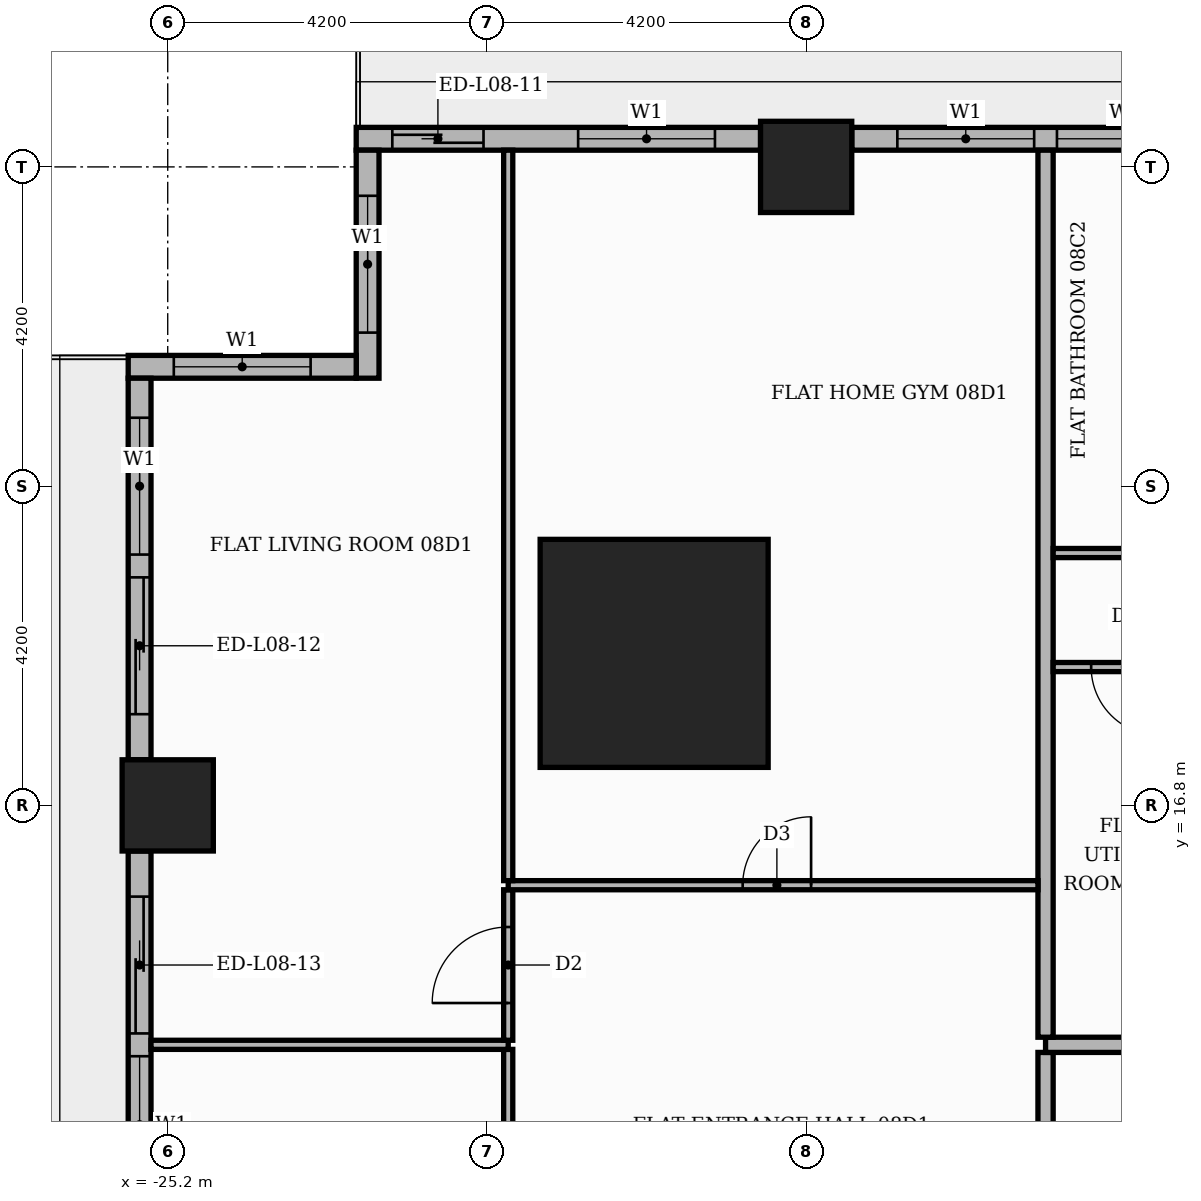
"""IFC4 building model, lengths in metres.
Left out: names, types, materials, properties, quantities, classifications, styles, units other than length and angle.
Written with IfcOpenShell. Run it as: python <this file> out.ifc"""

import sys

from ifc_helpers import new_model, si_unit, direction, frame, frame_2d, origin, origin_2d, place, context, subcontext, project, spatial, rectangle, extrude, element, fill, save


model = new_model("IFC4")
c1 = context("Model", 3, precision=1e-05, world=origin(), true_north=direction((0.0, 1.0)))
c2 = subcontext(c1, "Body", "Model", "MODEL_VIEW")
j1 = project(units=[si_unit("LENGTHUNIT", "METRE"), si_unit("PLANEANGLEUNIT", "RADIAN")], contexts=[c1])
p1 = place(None, origin())
s1 = spatial("IfcSite", under=j1, at=p1, CompositionType="ELEMENT")
p2 = place(p1, origin())
s2 = spatial("IfcBuilding", under=s1, at=p2, CompositionType="ELEMENT")
p3 = place(p2, frame((0.0, 0.0, 38.7)))
s3 = spatial("IfcBuildingStorey", under=s2, at=p3, CompositionType="ELEMENT", Elevation=38.7)
p4 = place(p3, frame((-18.8, 18.8, 0.0), z_axis=(0.0, 0.0, 1.0), x_axis=(1.0, 0.0, 0.0)))
e1 = element("IfcColumn", 1, at=p4, inside=s3, PredefinedType="COLUMN", context=c2, shape_type="SweptSolid", body=[
    extrude(rectangle(XDim=3.0, YDim=3.0, at=origin_2d()), origin(), (0.0, 0.0, 1.0), 3.9),
])
for number, where, z_axis, x_axis in (
    (2, (-16.8, 25.2, 0.0), (0.0, 0.0, 1.0), (1.0, 0.0, 0.0)),
    (3, (-25.2, 16.8, 0.0), (0.0, 0.0, 1.0), (1.0, 0.0, 0.0)),
):
    element("IfcColumn", number, at=place(p3, frame(where, z_axis=z_axis, x_axis=x_axis)), inside=s3, PredefinedType="COLUMN", context=c2, shape_type="SweptSolid", body=[
        extrude(rectangle(XDim=1.2, YDim=1.2, at=origin_2d()), origin(), (0.0, 0.0, 1.0), 3.9),
    ])
p5 = place(p3, frame((-9.0, 25.57, 0.0), z_axis=(0.0, 0.0, 1.0), x_axis=(-1.0, 0.0, 0.0)))
e4 = element("IfcWall", 4, at=p5, inside=s3, PredefinedType="STANDARD", context=c2, shape_type="SweptSolid", body=[
    extrude(rectangle(XDim=7.2, YDim=0.3, at=frame_2d((3.6, 0.0))), origin(), (0.0, 0.0, 1.0), 3.48),
])
p6 = place(p5, frame((0.6, 0.0, 0.9)))
e5 = element("IfcOpeningElement", 5, at=p6, cuts=e4, PredefinedType="OPENING", context=c2, shape_type="SweptSolid", body=[
    extrude(rectangle(XDim=1.8, YDim=2.1, at=frame_2d((0.9, 1.05))), frame((0.0, 0.16, 0.0), z_axis=(0.0, -1.0, 0.0), x_axis=(1.0, 0.0, 0.0)), (0.0, 0.0, 1.0), 0.32),
])
p7 = place(p5, frame((2.7, 0.0, 0.9)))
e6 = element("IfcOpeningElement", 6, at=p7, cuts=e4, PredefinedType="OPENING", context=c2, shape_type="SweptSolid", body=[
    extrude(rectangle(XDim=1.8, YDim=2.1, at=frame_2d((0.9, 1.05))), frame((0.0, 0.16, 0.0), z_axis=(0.0, -1.0, 0.0), x_axis=(1.0, 0.0, 0.0)), (0.0, 0.0, 1.0), 0.32),
])
p8 = place(p5, frame((4.8, 0.0, 0.9)))
e7 = element("IfcOpeningElement", 7, at=p8, cuts=e4, PredefinedType="OPENING", context=c2, shape_type="SweptSolid", body=[
    extrude(rectangle(XDim=1.8, YDim=2.1, at=frame_2d((0.9, 1.05))), frame((0.0, 0.16, 0.0), z_axis=(0.0, -1.0, 0.0), x_axis=(1.0, 0.0, 0.0)), (0.0, 0.0, 1.0), 0.32),
])
p9 = place(p3, frame((-17.4, 25.57, 0.0), z_axis=(0.0, 0.0, 1.0), x_axis=(-1.0, 0.0, 0.0)))
e8 = element("IfcWall", 8, at=p9, inside=s3, PredefinedType="STANDARD", context=c2, shape_type="SweptSolid", body=[
    extrude(rectangle(XDim=5.32, YDim=0.3, at=frame_2d((2.66, 0.0))), origin(), (0.0, 0.0, 1.0), 3.48),
])
p10 = place(p9, frame((0.6, 0.0, 0.9)))
e9 = element("IfcOpeningElement", 9, at=p10, cuts=e8, PredefinedType="OPENING", context=c2, shape_type="SweptSolid", body=[
    extrude(rectangle(XDim=1.8, YDim=2.1, at=frame_2d((0.9, 1.05))), frame((0.0, 0.16, 0.0), z_axis=(0.0, -1.0, 0.0), x_axis=(1.0, 0.0, 0.0)), (0.0, 0.0, 1.0), 0.32),
])
p11 = place(p9, frame((3.645, 0.0, 0.0)))
e10 = element("IfcOpeningElement", 10, at=p11, cuts=e8, PredefinedType="OPENING", context=c2, shape_type="SweptSolid", body=[
    extrude(rectangle(XDim=1.2, YDim=2.4, at=frame_2d((0.6, 1.2))), frame((0.0, 0.16, 0.0), z_axis=(0.0, -1.0, 0.0), x_axis=(1.0, 0.0, 0.0)), (0.0, 0.0, 1.0), 0.32),
])
p12 = place(p3, frame((-22.57, 25.42, 0.0), z_axis=(0.0, 0.0, 1.0), x_axis=(0.0, -1.0, 0.0)))
e11 = element("IfcWall", 11, at=p12, inside=s3, PredefinedType="STANDARD", context=c2, shape_type="SweptSolid", body=[
    extrude(rectangle(XDim=3.0, YDim=0.3, at=frame_2d((1.5, 0.0))), origin(), (0.0, 0.0, 1.0), 3.48),
])
p13 = place(p12, frame((0.6, 0.0, 0.9)))
e12 = element("IfcOpeningElement", 12, at=p13, cuts=e11, PredefinedType="OPENING", context=c2, shape_type="SweptSolid", body=[
    extrude(rectangle(XDim=1.8, YDim=2.1, at=frame_2d((0.9, 1.05))), frame((0.0, 0.16, 0.0), z_axis=(0.0, -1.0, 0.0), x_axis=(1.0, 0.0, 0.0)), (0.0, 0.0, 1.0), 0.32),
])
p14 = place(p3, frame((-22.72, 22.57, 0.0), z_axis=(0.0, 0.0, 1.0), x_axis=(-1.0, 0.0, 0.0)))
e13 = element("IfcWall", 13, at=p14, inside=s3, PredefinedType="STANDARD", context=c2, shape_type="SweptSolid", body=[
    extrude(rectangle(XDim=3.0, YDim=0.3, at=frame_2d((1.5, 0.0))), origin(), (0.0, 0.0, 1.0), 3.48),
])
p15 = place(p14, frame((0.6, 0.0, 0.9)))
e14 = element("IfcOpeningElement", 14, at=p15, cuts=e13, PredefinedType="OPENING", context=c2, shape_type="SweptSolid", body=[
    extrude(rectangle(XDim=1.8, YDim=2.1, at=frame_2d((0.9, 1.05))), frame((0.0, 0.16, 0.0), z_axis=(0.0, -1.0, 0.0), x_axis=(1.0, 0.0, 0.0)), (0.0, 0.0, 1.0), 0.32),
])
p16 = place(p3, frame((-25.57, 22.42, 0.0), z_axis=(0.0, 0.0, 1.0), x_axis=(0.0, -1.0, 0.0)))
e15 = element("IfcWall", 15, at=p16, inside=s3, PredefinedType="STANDARD", context=c2, shape_type="SweptSolid", body=[
    extrude(rectangle(XDim=5.02, YDim=0.3, at=frame_2d((2.51, 0.0))), origin(), (0.0, 0.0, 1.0), 3.48),
])
p17 = place(p16, frame((0.52, 0.0, 0.9)))
e16 = element("IfcOpeningElement", 16, at=p17, cuts=e15, PredefinedType="OPENING", context=c2, shape_type="SweptSolid", body=[
    extrude(rectangle(XDim=1.8, YDim=2.1, at=frame_2d((0.9, 1.05))), frame((0.0, 0.16, 0.0), z_axis=(0.0, -1.0, 0.0), x_axis=(1.0, 0.0, 0.0)), (0.0, 0.0, 1.0), 0.32),
])
p18 = place(p16, frame((2.62, 0.0, 0.0)))
e17 = element("IfcOpeningElement", 17, at=p18, cuts=e15, PredefinedType="OPENING", context=c2, shape_type="SweptSolid", body=[
    extrude(rectangle(XDim=1.8, YDim=2.4, at=frame_2d((0.9, 1.2))), frame((0.0, 0.16, 0.0), z_axis=(0.0, -1.0, 0.0), x_axis=(1.0, 0.0, 0.0)), (0.0, 0.0, 1.0), 0.32),
])
p19 = place(p3, frame((-25.57, 16.2, 0.0), z_axis=(0.0, 0.0, 1.0), x_axis=(0.0, -1.0, 0.0)))
e18 = element("IfcWall", 18, at=p19, inside=s3, PredefinedType="STANDARD", context=c2, shape_type="SweptSolid", body=[
    extrude(rectangle(XDim=7.2, YDim=0.3, at=frame_2d((3.6, 0.0))), origin(), (0.0, 0.0, 1.0), 3.48),
])
p20 = place(p19, frame((0.6, 0.0, 0.0)))
e19 = element("IfcOpeningElement", 19, at=p20, cuts=e18, PredefinedType="OPENING", context=c2, shape_type="SweptSolid", body=[
    extrude(rectangle(XDim=1.8, YDim=2.4, at=frame_2d((0.9, 1.2))), frame((0.0, 0.16, 0.0), z_axis=(0.0, -1.0, 0.0), x_axis=(1.0, 0.0, 0.0)), (0.0, 0.0, 1.0), 0.32),
])
p21 = place(p19, frame((2.7, 0.0, 0.9)))
e20 = element("IfcOpeningElement", 20, at=p21, cuts=e18, PredefinedType="OPENING", context=c2, shape_type="SweptSolid", body=[
    extrude(rectangle(XDim=1.8, YDim=2.1, at=frame_2d((0.9, 1.05))), frame((0.0, 0.16, 0.0), z_axis=(0.0, -1.0, 0.0), x_axis=(1.0, 0.0, 0.0)), (0.0, 0.0, 1.0), 0.32),
])
p22 = place(p19, frame((4.8, 0.0, 0.0)))
e21 = element("IfcOpeningElement", 21, at=p22, cuts=e18, PredefinedType="OPENING", context=c2, shape_type="SweptSolid", body=[
    extrude(rectangle(XDim=1.8, YDim=2.4, at=frame_2d((0.9, 1.2))), frame((0.0, 0.16, 0.0), z_axis=(0.0, -1.0, 0.0), x_axis=(1.0, 0.0, 0.0)), (0.0, 0.0, 1.0), 0.32),
])
p23 = place(p3, frame((-13.65, -13.55, 0.0), z_axis=(0.0, 0.0, 1.0), x_axis=(0.0, 1.0, 0.0)))
e22 = element("IfcWall", 22, at=p23, inside=s3, PredefinedType="PARTITIONING", context=c2, shape_type="SweptSolid", body=[
    extrude(rectangle(XDim=27.1, YDim=0.2, at=frame_2d((13.55, 0.0))), origin(), (0.0, 0.0, 1.0), 3.48),
])
p24 = place(p23, frame((24.55, 0.0, 0.0)))
e23 = element("IfcOpeningElement", 23, at=p24, cuts=e22, PredefinedType="OPENING", context=c2, shape_type="SweptSolid", body=[
    extrude(rectangle(XDim=1.1, YDim=2.4, at=frame_2d((0.55, 1.2))), frame((0.0, 0.11, 0.0), z_axis=(0.0, -1.0, 0.0), x_axis=(1.0, 0.0, 0.0)), (0.0, 0.0, 1.0), 0.22),
])
p25 = place(p3, frame((-20.72, 5.31, 0.0), z_axis=(0.0, 0.0, 1.0), x_axis=(0.0, 1.0, 0.0)))
e24 = element("IfcWall", 24, at=p25, inside=s3, PredefinedType="PARTITIONING", context=c2, shape_type="SweptSolid", body=[
    extrude(rectangle(XDim=8.28, YDim=0.12, at=frame_2d((4.14, 0.0))), origin(), (0.0, 0.0, 1.0), 3.48),
])
p26 = place(p25, frame((3.64, 0.0, 0.0)))
e25 = element("IfcOpeningElement", 25, at=p26, cuts=e24, PredefinedType="OPENING", context=c2, shape_type="SweptSolid", body=[
    extrude(rectangle(XDim=1.0, YDim=2.1, at=frame_2d((0.5, 1.05))), frame((0.0, 0.07, 0.0), z_axis=(0.0, -1.0, 0.0), x_axis=(1.0, 0.0, 0.0)), (0.0, 0.0, 1.0), 0.14),
])
p27 = place(p3, frame((-25.42, 13.65, 0.0), z_axis=(0.0, 0.0, 1.0), x_axis=(1.0, 0.0, 0.0)))
e26 = element("IfcWall", 26, at=p27, inside=s3, PredefinedType="PARTITIONING", context=c2, shape_type="SweptSolid", body=[
    extrude(rectangle(XDim=4.7, YDim=0.12, at=frame_2d((2.35, 0.0))), origin(), (0.0, 0.0, 1.0), 3.48),
])
p28 = place(p3, frame((-13.65, 13.65, 0.0), z_axis=(0.0, 0.0, 1.0), x_axis=(1.0, 0.0, 0.0)))
e27 = element("IfcWall", 27, at=p28, inside=s3, PredefinedType="PARTITIONING", context=c2, shape_type="SweptSolid", body=[
    extrude(rectangle(XDim=39.07, YDim=0.2, at=frame_2d((19.535, 0.0))), origin(), (0.0, 0.0, 1.0), 3.48),
])
p29 = place(p28, frame((24.65, 0.0, 0.0)))
e28 = element("IfcOpeningElement", 28, at=p29, cuts=e27, PredefinedType="OPENING", context=c2, shape_type="SweptSolid", body=[
    extrude(rectangle(XDim=1.1, YDim=2.4, at=frame_2d((0.55, 1.2))), frame((0.0, 0.11, 0.0), z_axis=(0.0, -1.0, 0.0), x_axis=(1.0, 0.0, 0.0)), (0.0, 0.0, 1.0), 0.22),
])
p30 = place(p28, frame((14.15, 0.0, 0.0)))
e29 = element("IfcOpeningElement", 29, at=p30, cuts=e27, PredefinedType="OPENING", context=c2, shape_type="SweptSolid", body=[
    extrude(rectangle(XDim=1.1, YDim=2.4, at=frame_2d((0.55, 1.2))), frame((0.0, 0.11, 0.0), z_axis=(0.0, -1.0, 0.0), x_axis=(1.0, 0.0, 0.0)), (0.0, 0.0, 1.0), 0.22),
])
p31 = place(p3, frame((-20.72, 13.71, 0.0), z_axis=(0.0, 0.0, 1.0), x_axis=(0.0, 1.0, 0.0)))
e30 = element("IfcWall", 30, at=p31, inside=s3, PredefinedType="PARTITIONING", context=c2, shape_type="SweptSolid", body=[
    extrude(rectangle(XDim=1.98, YDim=0.12, at=frame_2d((0.99, 0.0))), origin(), (0.0, 0.0, 1.0), 3.48),
])
p32 = place(p31, frame((0.49, 0.0, 0.0)))
e31 = element("IfcOpeningElement", 31, at=p32, cuts=e30, PredefinedType="OPENING", context=c2, shape_type="SweptSolid", body=[
    extrude(rectangle(XDim=1.0, YDim=2.1, at=frame_2d((0.5, 1.05))), frame((0.0, 0.07, 0.0), z_axis=(0.0, -1.0, 0.0), x_axis=(1.0, 0.0, 0.0)), (0.0, 0.0, 1.0), 0.14),
])
p33 = place(p3, frame((-13.65, 13.75, 0.0), z_axis=(0.0, 0.0, 1.0), x_axis=(0.0, 1.0, 0.0)))
e32 = element("IfcWall", 32, at=p33, inside=s3, PredefinedType="PARTITIONING", context=c2, shape_type="SweptSolid", body=[
    extrude(rectangle(XDim=11.67, YDim=0.2, at=frame_2d((5.835, 0.0))), origin(), (0.0, 0.0, 1.0), 3.48),
])
p34 = place(p3, frame((-20.72, 15.75, 0.0), z_axis=(0.0, 0.0, 1.0), x_axis=(1.0, 0.0, 0.0)))
e33 = element("IfcWall", 33, at=p34, inside=s3, PredefinedType="PARTITIONING", context=c2, shape_type="SweptSolid", body=[
    extrude(rectangle(XDim=6.97, YDim=0.12, at=frame_2d((3.485, 0.0))), origin(), (0.0, 0.0, 1.0), 3.48),
])
p35 = place(p34, frame((3.085, 0.0, 0.0)))
e34 = element("IfcOpeningElement", 34, at=p35, cuts=e33, PredefinedType="OPENING", context=c2, shape_type="SweptSolid", body=[
    extrude(rectangle(XDim=0.9, YDim=2.1, at=frame_2d((0.45, 1.05))), frame((0.0, 0.07, 0.0), z_axis=(0.0, -1.0, 0.0), x_axis=(1.0, 0.0, 0.0)), (0.0, 0.0, 1.0), 0.14),
])
p36 = place(p3, frame((-20.72, 15.81, 0.0), z_axis=(0.0, 0.0, 1.0), x_axis=(0.0, 1.0, 0.0)))
e35 = element("IfcWall", 35, at=p36, inside=s3, PredefinedType="PARTITIONING", context=c2, shape_type="SweptSolid", body=[
    extrude(rectangle(XDim=9.61, YDim=0.12, at=frame_2d((4.805, 0.0))), origin(), (0.0, 0.0, 1.0), 3.48),
])
p37 = place(p3, frame((-13.55, 18.62, 0.0), z_axis=(0.0, 0.0, 1.0), x_axis=(1.0, 0.0, 0.0)))
e36 = element("IfcWall", 36, at=p37, inside=s3, PredefinedType="PARTITIONING", context=c2, shape_type="SweptSolid", body=[
    extrude(rectangle(XDim=12.5, YDim=0.12, at=frame_2d((6.25, 0.0))), origin(), (0.0, 0.0, 1.0), 3.48),
])
p38 = place(p37, frame((8.9, 0.0, 0.0)))
e37 = element("IfcOpeningElement", 37, at=p38, cuts=e36, PredefinedType="OPENING", context=c2, shape_type="SweptSolid", body=[
    extrude(rectangle(XDim=0.9, YDim=2.1, at=frame_2d((0.45, 1.05))), frame((0.0, 0.07, 0.0), z_axis=(0.0, -1.0, 0.0), x_axis=(1.0, 0.0, 0.0)), (0.0, 0.0, 1.0), 0.14),
])
p39 = place(p37, frame((4.85, 0.0, 0.0)))
e38 = element("IfcOpeningElement", 38, at=p39, cuts=e36, PredefinedType="OPENING", context=c2, shape_type="SweptSolid", body=[
    extrude(rectangle(XDim=0.9, YDim=2.1, at=frame_2d((0.45, 1.05))), frame((0.0, 0.07, 0.0), z_axis=(0.0, -1.0, 0.0), x_axis=(1.0, 0.0, 0.0)), (0.0, 0.0, 1.0), 0.14),
])
p40 = place(p37, frame((2.75, 0.0, 0.0)))
e39 = element("IfcOpeningElement", 39, at=p40, cuts=e36, PredefinedType="OPENING", context=c2, shape_type="SweptSolid", body=[
    extrude(rectangle(XDim=0.9, YDim=2.1, at=frame_2d((0.45, 1.05))), frame((0.0, 0.07, 0.0), z_axis=(0.0, -1.0, 0.0), x_axis=(1.0, 0.0, 0.0)), (0.0, 0.0, 1.0), 0.14),
])
p41 = place(p37, frame((0.5, 0.0, 0.0)))
e40 = element("IfcOpeningElement", 40, at=p41, cuts=e36, PredefinedType="OPENING", context=c2, shape_type="SweptSolid", body=[
    extrude(rectangle(XDim=0.9, YDim=2.1, at=frame_2d((0.45, 1.05))), frame((0.0, 0.07, 0.0), z_axis=(0.0, -1.0, 0.0), x_axis=(1.0, 0.0, 0.0)), (0.0, 0.0, 1.0), 0.14),
])
p42 = place(p3, frame((-13.55, 20.12, 0.0), z_axis=(0.0, 0.0, 1.0), x_axis=(1.0, 0.0, 0.0)))
e41 = element("IfcWall", 41, at=p42, inside=s3, PredefinedType="PARTITIONING", context=c2, shape_type="SweptSolid", body=[
    extrude(rectangle(XDim=18.7, YDim=0.12, at=frame_2d((9.35, 0.0))), origin(), (0.0, 0.0, 1.0), 3.48),
])
p43 = place(p42, frame((16.2, 0.0, 0.0)))
e42 = element("IfcOpeningElement", 42, at=p43, cuts=e41, PredefinedType="OPENING", context=c2, shape_type="SweptSolid", body=[
    extrude(rectangle(XDim=1.0, YDim=2.1, at=frame_2d((0.5, 1.05))), frame((0.0, 0.07, 0.0), z_axis=(0.0, -1.0, 0.0), x_axis=(1.0, 0.0, 0.0)), (0.0, 0.0, 1.0), 0.14),
])
p44 = place(p42, frame((12.05, 0.0, 0.0)))
e43 = element("IfcOpeningElement", 43, at=p44, cuts=e41, PredefinedType="OPENING", context=c2, shape_type="SweptSolid", body=[
    extrude(rectangle(XDim=0.9, YDim=2.1, at=frame_2d((0.45, 1.05))), frame((0.0, 0.07, 0.0), z_axis=(0.0, -1.0, 0.0), x_axis=(1.0, 0.0, 0.0)), (0.0, 0.0, 1.0), 0.14),
])
p45 = place(p42, frame((3.65, 0.0, 0.0)))
e44 = element("IfcOpeningElement", 44, at=p45, cuts=e41, PredefinedType="OPENING", context=c2, shape_type="SweptSolid", body=[
    extrude(rectangle(XDim=0.9, YDim=2.1, at=frame_2d((0.45, 1.05))), frame((0.0, 0.07, 0.0), z_axis=(0.0, -1.0, 0.0), x_axis=(1.0, 0.0, 0.0)), (0.0, 0.0, 1.0), 0.14),
])
p46 = place(p7, origin())
e45 = element("IfcWindow", 45, at=p46, inside=s3, PartitioningType="SINGLE_PANEL", PredefinedType="WINDOW", context=c2, shape_type="SweptSolid", body=[
    extrude(rectangle(XDim=1.8, YDim=2.1, at=frame_2d((0.9, 1.05))), frame((0.0, 0.03, 0.0), z_axis=(0.0, -1.0, 0.0), x_axis=(1.0, 0.0, 0.0)), (0.0, 0.0, 1.0), 0.06),
])
fill(e6, e45)
p47 = place(p8, origin())
e46 = element("IfcWindow", 46, at=p47, inside=s3, PartitioningType="SINGLE_PANEL", PredefinedType="WINDOW", context=c2, shape_type="SweptSolid", body=[
    extrude(rectangle(XDim=1.8, YDim=2.1, at=frame_2d((0.9, 1.05))), frame((0.0, 0.03, 0.0), z_axis=(0.0, -1.0, 0.0), x_axis=(1.0, 0.0, 0.0)), (0.0, 0.0, 1.0), 0.06),
])
fill(e7, e46)
p48 = place(p10, origin())
e47 = element("IfcWindow", 47, at=p48, inside=s3, PartitioningType="SINGLE_PANEL", PredefinedType="WINDOW", context=c2, shape_type="SweptSolid", body=[
    extrude(rectangle(XDim=1.8, YDim=2.1, at=frame_2d((0.9, 1.05))), frame((0.0, 0.03, 0.0), z_axis=(0.0, -1.0, 0.0), x_axis=(1.0, 0.0, 0.0)), (0.0, 0.0, 1.0), 0.06),
])
fill(e9, e47)
p49 = place(p11, origin())
e48 = element("IfcDoor", 48, at=p49, inside=s3, OperationType="SLIDING_TO_RIGHT", PredefinedType="DOOR", context=c2, shape_type="SweptSolid", body=[
    extrude(rectangle(XDim=1.2, YDim=2.4, at=frame_2d((0.6, 1.2))), frame((0.0, 0.025, 0.0), z_axis=(0.0, -1.0, 0.0), x_axis=(1.0, 0.0, 0.0)), (0.0, 0.0, 1.0), 0.05),
])
fill(e10, e48)
p50 = place(p13, origin())
e49 = element("IfcWindow", 49, at=p50, inside=s3, PartitioningType="SINGLE_PANEL", PredefinedType="WINDOW", context=c2, shape_type="SweptSolid", body=[
    extrude(rectangle(XDim=1.8, YDim=2.1, at=frame_2d((0.9, 1.05))), frame((0.0, 0.03, 0.0), z_axis=(0.0, -1.0, 0.0), x_axis=(1.0, 0.0, 0.0)), (0.0, 0.0, 1.0), 0.06),
])
fill(e12, e49)
p51 = place(p15, origin())
e50 = element("IfcWindow", 50, at=p51, inside=s3, PartitioningType="SINGLE_PANEL", PredefinedType="WINDOW", context=c2, shape_type="SweptSolid", body=[
    extrude(rectangle(XDim=1.8, YDim=2.1, at=frame_2d((0.9, 1.05))), frame((0.0, 0.03, 0.0), z_axis=(0.0, -1.0, 0.0), x_axis=(1.0, 0.0, 0.0)), (0.0, 0.0, 1.0), 0.06),
])
fill(e14, e50)
p52 = place(p17, origin())
e51 = element("IfcWindow", 51, at=p52, inside=s3, PartitioningType="SINGLE_PANEL", PredefinedType="WINDOW", context=c2, shape_type="SweptSolid", body=[
    extrude(rectangle(XDim=1.8, YDim=2.1, at=frame_2d((0.9, 1.05))), frame((0.0, 0.03, 0.0), z_axis=(0.0, -1.0, 0.0), x_axis=(1.0, 0.0, 0.0)), (0.0, 0.0, 1.0), 0.06),
])
fill(e16, e51)
p53 = place(p18, origin())
e52 = element("IfcDoor", 52, at=p53, inside=s3, OperationType="SLIDING_TO_RIGHT", PredefinedType="DOOR", context=c2, shape_type="SweptSolid", body=[
    extrude(rectangle(XDim=1.8, YDim=2.4, at=frame_2d((0.9, 1.2))), frame((0.0, 0.025, 0.0), z_axis=(0.0, -1.0, 0.0), x_axis=(1.0, 0.0, 0.0)), (0.0, 0.0, 1.0), 0.05),
])
fill(e17, e52)
p54 = place(p20, origin())
e53 = element("IfcDoor", 53, at=p54, inside=s3, OperationType="SLIDING_TO_LEFT", PredefinedType="DOOR", context=c2, shape_type="SweptSolid", body=[
    extrude(rectangle(XDim=1.8, YDim=2.4, at=frame_2d((0.9, 1.2))), frame((0.0, 0.025, 0.0), z_axis=(0.0, -1.0, 0.0), x_axis=(1.0, 0.0, 0.0)), (0.0, 0.0, 1.0), 0.05),
])
fill(e19, e53)
p55 = place(p21, origin())
e54 = element("IfcWindow", 54, at=p55, inside=s3, PartitioningType="SINGLE_PANEL", PredefinedType="WINDOW", context=c2, shape_type="SweptSolid", body=[
    extrude(rectangle(XDim=1.8, YDim=2.1, at=frame_2d((0.9, 1.05))), frame((0.0, 0.03, 0.0), z_axis=(0.0, -1.0, 0.0), x_axis=(1.0, 0.0, 0.0)), (0.0, 0.0, 1.0), 0.06),
])
fill(e20, e54)
p56 = place(p41, frame((0.9, 0.0, 0.0), z_axis=(0.0, 0.0, 1.0), x_axis=(-1.0, 0.0, 0.0)))
e55 = element("IfcDoor", 55, at=p56, inside=s3, OperationType="SINGLE_SWING_RIGHT", PredefinedType="DOOR", context=c2, shape_type="SweptSolid", body=[
    extrude(rectangle(XDim=0.9, YDim=2.1, at=frame_2d((0.45, 1.05))), frame((0.0, 0.025, 0.0), z_axis=(0.0, -1.0, 0.0), x_axis=(1.0, 0.0, 0.0)), (0.0, 0.0, 1.0), 0.05),
])
fill(e40, e55)
p57 = place(p35, origin())
e56 = element("IfcDoor", 56, at=p57, inside=s3, OperationType="SINGLE_SWING_RIGHT", PredefinedType="DOOR", context=c2, shape_type="SweptSolid", body=[
    extrude(rectangle(XDim=0.9, YDim=2.1, at=frame_2d((0.45, 1.05))), frame((0.0, 0.025, 0.0), z_axis=(0.0, -1.0, 0.0), x_axis=(1.0, 0.0, 0.0)), (0.0, 0.0, 1.0), 0.05),
])
fill(e34, e56)
p58 = place(p32, origin())
e57 = element("IfcDoor", 57, at=p58, inside=s3, OperationType="SINGLE_SWING_LEFT", PredefinedType="DOOR", context=c2, shape_type="SweptSolid", body=[
    extrude(rectangle(XDim=1.0, YDim=2.1, at=frame_2d((0.5, 1.05))), frame((0.0, 0.025, 0.0), z_axis=(0.0, -1.0, 0.0), x_axis=(1.0, 0.0, 0.0)), (0.0, 0.0, 1.0), 0.05),
])
fill(e31, e57)
save(model, sys.argv[1])
